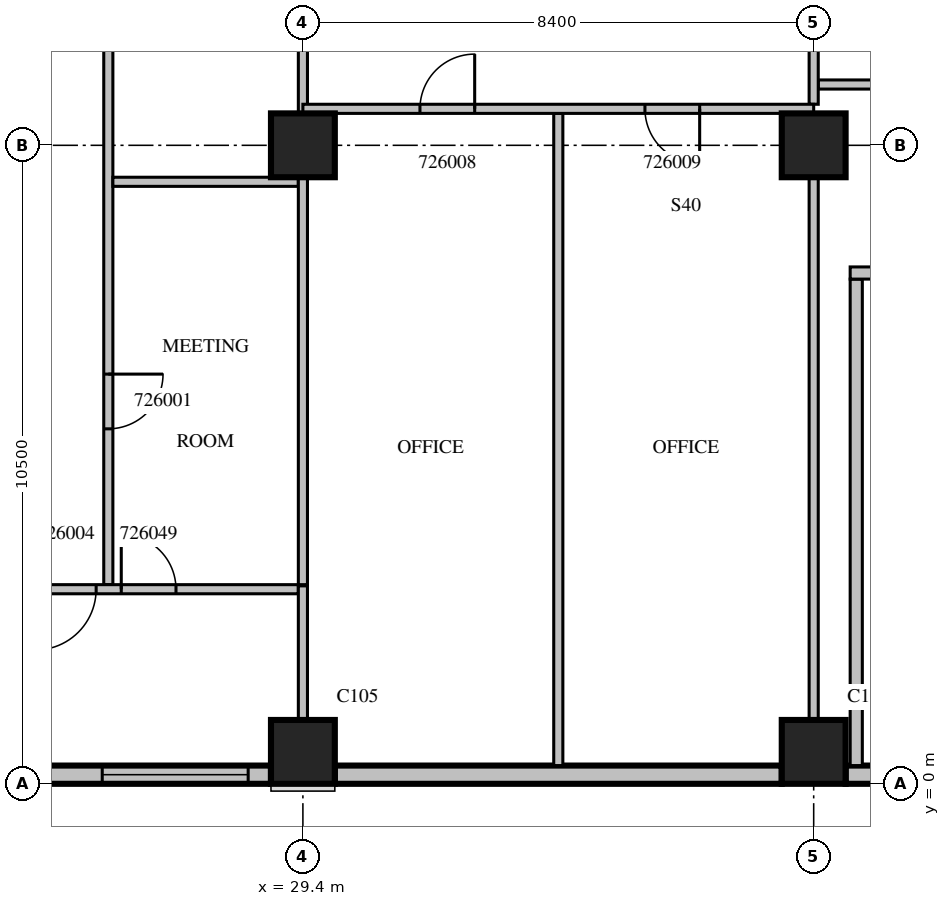
"""IFC4 building model, lengths in metres.
Left out: names, types, materials, properties, quantities, classifications, styles, units other than length and angle.
Written with IfcOpenShell. Run it as: python <this file> out.ifc"""

import sys

from ifc_helpers import new_model, si_unit, direction, frame, frame_2d, origin, origin_2d, place, context, subcontext, project, spatial, rectangle, extrude, source, transform, mapped, element, fill, save


model = new_model("IFC4")
c1 = context("Model", 3, precision=1e-05, world=origin(), true_north=direction((0.0, 1.0)))
c2 = subcontext(c1, "Body", "Model", "MODEL_VIEW")
j1 = project(units=[si_unit("LENGTHUNIT", "METRE"), si_unit("PLANEANGLEUNIT", "RADIAN")], contexts=[c1])
p1 = place(None, origin())
s1 = spatial("IfcSite", under=j1, at=p1, CompositionType="ELEMENT")
p2 = place(p1, origin())
s2 = spatial("IfcBuilding", under=s1, at=p2, CompositionType="ELEMENT")
p3 = place(p2, frame((0.0, 0.0, 120.3)))
s3 = spatial("IfcBuildingStorey", under=s2, at=p3, CompositionType="ELEMENT", Elevation=120.3)
m1 = source(origin(), c2, "Body", "SweptSolid", [
    extrude(rectangle(XDim=1.05, YDim=1.05, at=origin_2d()), origin(), (0.0, 0.0, 1.0), 4.2),
])
for number, where, z_axis, x_axis in (
    (1, (29.4, 0.525, 0.0), (0.0, 0.0, 1.0), (1.0, 0.0, 0.0)),
    (2, (37.8, 0.525, 0.0), (0.0, 0.0, 1.0), (1.0, 0.0, 0.0)),
    (3, (29.4, 10.5, 0.0), (0.0, 0.0, 1.0), (1.0, 0.0, 0.0)),
    (4, (37.8, 10.5, 0.0), (0.0, 0.0, 1.0), (1.0, 0.0, 0.0)),
):
    element("IfcColumn", number, at=place(p3, frame(where, z_axis=z_axis, x_axis=x_axis)), inside=s3, PredefinedType="COLUMN", context=c2, shape_type="MappedRepresentation", body=[
        mapped(m1, transform((0.0, 0.0, 0.0), scale=1.0)),
    ])
m2 = source(origin(), c2, "Body", "SweptSolid", [
    extrude(rectangle(XDim=7.35, YDim=0.3, at=frame_2d((3.675, 0.0))), origin(), (0.0, 0.0, 1.0), 3.8),
])
p4 = place(p3, frame((21.525, 0.15, 0.0), z_axis=(0.0, 0.0, 1.0), x_axis=(1.0, 0.0, 0.0)))
e5 = element("IfcWall", 5, at=p4, inside=s3, PredefinedType="STANDARD", context=c2, shape_type="MappedRepresentation", body=[
    mapped(m2, transform((0.0, 0.0, 0.0), scale=1.0)),
])
m3 = source(origin(), c2, "Body", "SweptSolid", [
    extrude(rectangle(XDim=2.4, YDim=2.7, at=frame_2d((1.2, 1.35))), frame((0.0, 0.16, 0.0), z_axis=(0.0, -1.0, 0.0), x_axis=(1.0, 0.0, 0.0)), (0.0, 0.0, 1.0), 0.32),
])
p5 = place(p4, frame((0.375, 0.0, 0.6)))
e6 = element("IfcOpeningElement", 6, at=p5, cuts=e5, PredefinedType="OPENING", context=c2, shape_type="MappedRepresentation", body=[
    mapped(m3, transform((0.0, 0.0, 0.0), scale=1.0)),
])
p6 = place(p4, frame((4.575, 0.0, 0.6)))
e7 = element("IfcOpeningElement", 7, at=p6, cuts=e5, PredefinedType="OPENING", context=c2, shape_type="MappedRepresentation", body=[
    mapped(m3, transform((0.0, 0.0, 0.0), scale=1.0)),
])
p7 = place(p3, frame((29.925, 0.15, 0.0), z_axis=(0.0, 0.0, 1.0), x_axis=(1.0, 0.0, 0.0)))
e8 = element("IfcWall", 8, at=p7, inside=s3, PredefinedType="STANDARD", context=c2, shape_type="MappedRepresentation", body=[
    mapped(m2, transform((0.0, 0.0, 0.0), scale=1.0)),
])
m4 = source(origin(), c2, "Body", "SweptSolid", [
    extrude(rectangle(XDim=1.875, YDim=0.3, at=frame_2d((0.938, 0.0))), origin(), (0.0, 0.0, 1.0), 3.8),
])
p8 = place(p3, frame((38.325, 0.15, 0.0), z_axis=(0.0, 0.0, 1.0), x_axis=(1.0, 0.0, 0.0)))
e9 = element("IfcWall", 9, at=p8, inside=s3, PredefinedType="STANDARD", context=c2, shape_type="MappedRepresentation", body=[
    mapped(m4, transform((0.0, 0.0, 0.0), scale=1.0)),
])
m5 = source(origin(), c2, "Body", "SweptSolid", [
    extrude(rectangle(XDim=8.0, YDim=0.2, at=frame_2d((4.0, 0.0))), origin(), (0.0, 0.0, 1.0), 3.8),
])
p9 = place(p3, frame((38.5, 0.3, 0.0), z_axis=(0.0, 0.0, 1.0), x_axis=(0.0, 1.0, 0.0)))
e10 = element("IfcWall", 10, at=p9, inside=s3, PredefinedType="PARTITIONING", context=c2, shape_type="MappedRepresentation", body=[
    mapped(m5, transform((0.0, 0.0, 0.0), scale=1.0)),
])
m6 = source(origin(), c2, "Body", "SweptSolid", [
    extrude(rectangle(XDim=5.45, YDim=0.2, at=frame_2d((2.725, 0.0))), origin(), (0.0, 0.0, 1.0), 3.8),
])
p10 = place(p3, frame((38.4, 8.4, 0.0), z_axis=(0.0, 0.0, 1.0), x_axis=(1.0, 0.0, 0.0)))
e11 = element("IfcWall", 11, at=p10, inside=s3, PredefinedType="PARTITIONING", context=c2, shape_type="MappedRepresentation", body=[
    mapped(m6, transform((0.0, 0.0, 0.0), scale=1.0)),
])
m7 = source(origin(), c2, "Body", "SweptSolid", [
    extrude(rectangle(XDim=1.2, YDim=2.1, at=frame_2d((0.6, 1.05))), frame((0.0, 0.11, 0.0), z_axis=(0.0, -1.0, 0.0), x_axis=(1.0, 0.0, 0.0)), (0.0, 0.0, 1.0), 0.22),
])
p11 = place(p10, frame((0.4, 0.0, 0.0)))
e12 = element("IfcOpeningElement", 12, at=p11, cuts=e11, PredefinedType="OPENING", context=c2, shape_type="MappedRepresentation", body=[
    mapped(m7, transform((0.0, 0.0, 0.0), scale=1.0)),
])
m8 = source(origin(), c2, "Body", "SweptSolid", [
    extrude(rectangle(XDim=0.9, YDim=2.1, at=frame_2d((0.45, 1.05))), frame((0.0, 0.11, 0.0), z_axis=(0.0, -1.0, 0.0), x_axis=(1.0, 0.0, 0.0)), (0.0, 0.0, 1.0), 0.22),
])
p12 = place(p10, frame((3.25, 0.0, 0.0)))
e13 = element("IfcOpeningElement", 13, at=p12, cuts=e11, PredefinedType="OPENING", context=c2, shape_type="MappedRepresentation", body=[
    mapped(m8, transform((0.0, 0.0, 0.0), scale=1.0)),
])
m9 = source(origin(), c2, "Body", "SweptSolid", [
    extrude(rectangle(XDim=11.725, YDim=0.15, at=frame_2d((5.862, 0.0))), origin(), (0.0, 0.0, 1.0), 3.8),
])
p13 = place(p3, frame((26.2, 15.0, 0.0), z_axis=(0.0, 0.0, 1.0), x_axis=(0.0, -1.0, 0.0)))
e14 = element("IfcWall", 14, at=p13, inside=s3, PredefinedType="PARTITIONING", context=c2, shape_type="MappedRepresentation", body=[
    mapped(m9, transform((0.0, 0.0, 0.0), scale=1.0)),
])
m10 = source(origin(), c2, "Body", "SweptSolid", [
    extrude(rectangle(XDim=0.9, YDim=2.1, at=frame_2d((0.45, 1.05))), frame((0.0, 0.085, 0.0), z_axis=(0.0, -1.0, 0.0), x_axis=(1.0, 0.0, 0.0)), (0.0, 0.0, 1.0), 0.17),
])
p14 = place(p13, frame((8.262, 0.0, 0.0)))
e15 = element("IfcOpeningElement", 15, at=p14, cuts=e14, PredefinedType="OPENING", context=c2, shape_type="MappedRepresentation", body=[
    mapped(m10, transform((0.0, 0.0, 0.0), scale=1.0)),
])
p15 = place(p13, frame((1.525, 0.0, 0.0)))
e16 = element("IfcOpeningElement", 16, at=p15, cuts=e14, PredefinedType="OPENING", context=c2, shape_type="MappedRepresentation", body=[
    mapped(m10, transform((0.0, 0.0, 0.0), scale=1.0)),
])
m11 = source(origin(), c2, "Body", "SweptSolid", [
    extrude(rectangle(XDim=3.05, YDim=0.15, at=frame_2d((1.525, 0.0))), origin(), (0.0, 0.0, 1.0), 3.8),
])
p16 = place(p3, frame((29.325, 9.9, 0.0), z_axis=(0.0, 0.0, 1.0), x_axis=(-1.0, 0.0, 0.0)))
e17 = element("IfcWall", 17, at=p16, inside=s3, PredefinedType="PARTITIONING", context=c2, shape_type="MappedRepresentation", body=[
    mapped(m11, transform((0.0, 0.0, 0.0), scale=1.0)),
])
m12 = source(origin(), c2, "Body", "SweptSolid", [
    extrude(rectangle(XDim=6.701, YDim=0.15, at=frame_2d((3.35, 0.0))), origin(), (0.0, 0.0, 1.0), 3.8),
])
p17 = place(p3, frame((29.4, 3.275, 0.0), z_axis=(0.0, 0.0, 1.0), x_axis=(0.0, 1.0, 0.0)))
e18 = element("IfcWall", 18, at=p17, inside=s3, PredefinedType="PARTITIONING", context=c2, shape_type="MappedRepresentation", body=[
    mapped(m12, transform((0.0, 0.0, 0.0), scale=1.0)),
])
m13 = source(origin(), c2, "Body", "SweptSolid", [
    extrude(rectangle(XDim=3.976, YDim=0.15, at=frame_2d((1.988, 0.0))), origin(), (0.0, 0.0, 1.0), 3.8),
])
p18 = place(p3, frame((29.4, 11.024, 0.0), z_axis=(0.0, 0.0, 1.0), x_axis=(0.0, 1.0, 0.0)))
e19 = element("IfcWall", 19, at=p18, inside=s3, PredefinedType="PARTITIONING", context=c2, shape_type="MappedRepresentation", body=[
    mapped(m13, transform((0.0, 0.0, 0.0), scale=1.0)),
])
m14 = source(origin(), c2, "Body", "SweptSolid", [
    extrude(rectangle(XDim=7.325, YDim=0.15, at=frame_2d((3.663, 0.0))), origin(), (0.0, 0.0, 1.0), 3.8),
])
p19 = place(p3, frame((22.0, 3.2, 0.0), z_axis=(0.0, 0.0, 1.0), x_axis=(1.0, 0.0, 0.0)))
e20 = element("IfcWall", 20, at=p19, inside=s3, PredefinedType="PARTITIONING", context=c2, shape_type="MappedRepresentation", body=[
    mapped(m14, transform((0.0, 0.0, 0.0), scale=1.0)),
])
m15 = source(origin(), c2, "Body", "SweptSolid", [
    extrude(rectangle(XDim=1.0, YDim=2.1, at=frame_2d((0.5, 1.05))), frame((0.0, 0.085, 0.0), z_axis=(0.0, -1.0, 0.0), x_axis=(1.0, 0.0, 0.0)), (0.0, 0.0, 1.0), 0.17),
])
p20 = place(p19, frame((3.0, 0.0, 0.0)))
e21 = element("IfcOpeningElement", 21, at=p20, cuts=e20, PredefinedType="OPENING", context=c2, shape_type="MappedRepresentation", body=[
    mapped(m15, transform((0.0, 0.0, 0.0), scale=1.0)),
])
p21 = place(p19, frame((4.413, 0.0, 0.0)))
e22 = element("IfcOpeningElement", 22, at=p21, cuts=e20, PredefinedType="OPENING", context=c2, shape_type="MappedRepresentation", body=[
    mapped(m10, transform((0.0, 0.0, 0.0), scale=1.0)),
])
m16 = source(origin(), c2, "Body", "SweptSolid", [
    extrude(rectangle(XDim=6.45, YDim=0.15, at=frame_2d((3.225, 0.0))), origin(), (0.0, 0.0, 1.0), 3.8),
])
p22 = place(p3, frame((37.875, 11.5, 0.0), z_axis=(0.0, 0.0, 1.0), x_axis=(1.0, 0.0, 0.0)))
e23 = element("IfcWall", 23, at=p22, inside=s3, PredefinedType="PARTITIONING", context=c2, shape_type="MappedRepresentation", body=[
    mapped(m16, transform((0.0, 0.0, 0.0), scale=1.0)),
])
m17 = source(origin(), c2, "Body", "SweptSolid", [
    extrude(rectangle(XDim=10.725, YDim=0.15, at=frame_2d((5.362, 0.0))), origin(), (0.0, 0.0, 1.0), 3.8),
])
p23 = place(p3, frame((33.6, 0.3, 0.0), z_axis=(0.0, 0.0, 1.0), x_axis=(0.0, 1.0, 0.0)))
e24 = element("IfcWall", 24, at=p23, inside=s3, PredefinedType="PARTITIONING", context=c2, shape_type="MappedRepresentation", body=[
    mapped(m17, transform((0.0, 0.0, 0.0), scale=1.0)),
])
m18 = source(origin(), c2, "Body", "SweptSolid", [
    extrude(rectangle(XDim=2.206, YDim=0.15, at=frame_2d((1.103, 0.0))), origin(), (0.0, 0.0, 1.0), 3.8),
])
p24 = place(p3, frame((29.4, 1.049, 0.0), z_axis=(0.0, 0.0, 1.0), x_axis=(0.0, 1.0, 0.0)))
e25 = element("IfcWall", 25, at=p24, inside=s3, PredefinedType="PARTITIONING", context=c2, shape_type="MappedRepresentation", body=[
    mapped(m18, transform((0.0, 0.0, 0.0), scale=1.0)),
])
m19 = source(origin(), c2, "Body", "SweptSolid", [
    extrude(rectangle(XDim=8.927, YDim=0.15, at=frame_2d((4.463, 0.0))), origin(), (0.0, 0.0, 1.0), 3.8),
])
p25 = place(p3, frame((37.8, 1.049, 0.0), z_axis=(0.0, 0.0, 1.0), x_axis=(0.0, 1.0, 0.0)))
e26 = element("IfcWall", 26, at=p25, inside=s3, PredefinedType="PARTITIONING", context=c2, shape_type="MappedRepresentation", body=[
    mapped(m19, transform((0.0, 0.0, 0.0), scale=1.0)),
])
m20 = source(origin(), c2, "Body", "SweptSolid", [
    extrude(rectangle(XDim=3.825, YDim=0.15, at=frame_2d((1.913, 0.0))), origin(), (0.0, 0.0, 1.0), 3.8),
])
p26 = place(p3, frame((37.8, 11.175, 0.0), z_axis=(0.0, 0.0, 1.0), x_axis=(0.0, 1.0, 0.0)))
e27 = element("IfcWall", 27, at=p26, inside=s3, PredefinedType="PARTITIONING", context=c2, shape_type="MappedRepresentation", body=[
    mapped(m20, transform((0.0, 0.0, 0.0), scale=1.0)),
])
m21 = source(origin(), c2, "Body", "SweptSolid", [
    extrude(rectangle(XDim=8.4, YDim=0.15, at=frame_2d((4.2, 0.0))), origin(), (0.0, 0.0, 1.0), 3.8),
])
p27 = place(p3, frame((37.8, 11.1, 0.0), z_axis=(0.0, 0.0, 1.0), x_axis=(-1.0, 0.0, 0.0)))
e28 = element("IfcWall", 28, at=p27, inside=s3, PredefinedType="PARTITIONING", context=c2, shape_type="MappedRepresentation", body=[
    mapped(m21, transform((0.0, 0.0, 0.0), scale=1.0)),
])
p28 = place(p27, frame((5.575, 0.0, 0.0)))
e29 = element("IfcOpeningElement", 29, at=p28, cuts=e28, PredefinedType="OPENING", context=c2, shape_type="MappedRepresentation", body=[
    mapped(m10, transform((0.0, 0.0, 0.0), scale=1.0)),
])
p29 = place(p27, frame((1.875, 0.0, 0.0)))
e30 = element("IfcOpeningElement", 30, at=p29, cuts=e28, PredefinedType="OPENING", context=c2, shape_type="MappedRepresentation", body=[
    mapped(m10, transform((0.0, 0.0, 0.0), scale=1.0)),
])
m22 = source(origin(), c2, "Body", "SweptSolid", [
    extrude(rectangle(XDim=2.4, YDim=2.7, at=frame_2d((1.2, 1.35))), frame((0.0, 0.03, 0.0), z_axis=(0.0, -1.0, 0.0), x_axis=(1.0, 0.0, 0.0)), (0.0, 0.0, 1.0), 0.06),
])
p30 = place(p6, origin())
e31 = element("IfcWindow", 31, at=p30, inside=s3, PartitioningType="SINGLE_PANEL", PredefinedType="WINDOW", context=c2, shape_type="MappedRepresentation", body=[
    mapped(m22, transform((0.0, 0.0, 0.0), scale=1.0)),
])
fill(e7, e31)
m23 = source(origin(), c2, "Body", "SweptSolid", [
    extrude(rectangle(XDim=0.9, YDim=2.1, at=frame_2d((0.45, 1.05))), frame((0.0, 0.025, 0.0), z_axis=(0.0, -1.0, 0.0), x_axis=(1.0, 0.0, 0.0)), (0.0, 0.0, 1.0), 0.05),
])
p31 = place(p14, origin())
e32 = element("IfcDoor", 32, at=p31, inside=s3, OperationType="SINGLE_SWING_LEFT", PredefinedType="DOOR", context=c2, shape_type="MappedRepresentation", body=[
    mapped(m23, transform((0.0, 0.0, 0.0), scale=1.0)),
])
fill(e15, e32)
m24 = source(origin(), c2, "Body", "SweptSolid", [
    extrude(rectangle(XDim=1.0, YDim=2.1, at=frame_2d((0.5, 1.05))), frame((0.0, 0.025, 0.0), z_axis=(0.0, -1.0, 0.0), x_axis=(1.0, 0.0, 0.0)), (0.0, 0.0, 1.0), 0.05),
])
p32 = place(p20, origin())
e33 = element("IfcDoor", 33, at=p32, inside=s3, OperationType="SINGLE_SWING_RIGHT", PredefinedType="DOOR", context=c2, shape_type="MappedRepresentation", body=[
    mapped(m24, transform((0.0, 0.0, 0.0), scale=1.0)),
])
fill(e21, e33)
p33 = place(p28, origin())
e34 = element("IfcDoor", 34, at=p33, inside=s3, OperationType="SINGLE_SWING_RIGHT", PredefinedType="DOOR", context=c2, shape_type="MappedRepresentation", body=[
    mapped(m23, transform((0.0, 0.0, 0.0), scale=1.0)),
])
fill(e29, e34)
p34 = place(p29, origin())
e35 = element("IfcDoor", 35, at=p34, inside=s3, OperationType="SINGLE_SWING_LEFT", PredefinedType="DOOR", context=c2, shape_type="MappedRepresentation", body=[
    mapped(m23, transform((0.0, 0.0, 0.0), scale=1.0)),
])
fill(e30, e35)
p35 = place(p21, origin())
e36 = element("IfcDoor", 36, at=p35, inside=s3, OperationType="SINGLE_SWING_LEFT", PredefinedType="DOOR", context=c2, shape_type="MappedRepresentation", body=[
    mapped(m23, transform((0.0, 0.0, 0.0), scale=1.0)),
])
fill(e22, e36)
save(model, sys.argv[1])
